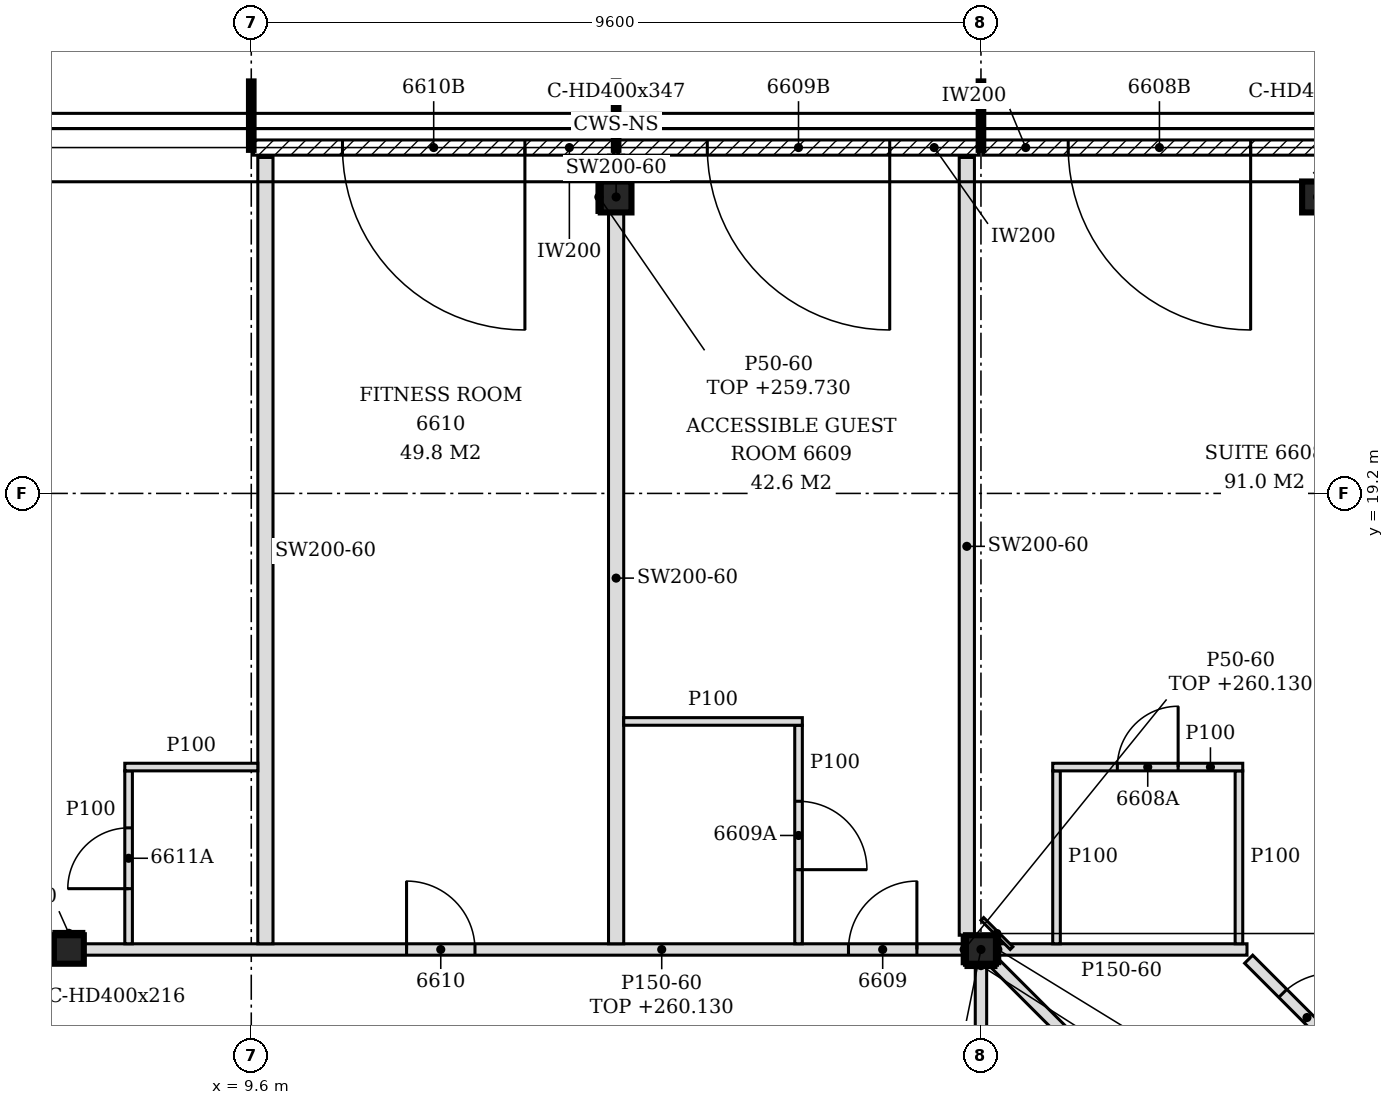
"""IFC4 building model, lengths in metres.
Left out: names, types, materials, properties, quantities, classifications, styles, units other than length and angle.
Written with IfcOpenShell. Run it as: python <this file> out.ifc"""

import sys

from ifc_helpers import new_model, si_unit, direction, frame, frame_2d, origin, origin_2d, place, context, subcontext, project, spatial, polyline, rectangle, i_section, outline, extrude, clip, halfspace, element, fill, save


model = new_model("IFC4")
c1 = context("Model", 3, precision=1e-05, world=origin(), true_north=direction((0.0, 1.0)))
c2 = subcontext(c1, "Body", "Model", "MODEL_VIEW")
j1 = project(units=[si_unit("LENGTHUNIT", "METRE"), si_unit("PLANEANGLEUNIT", "RADIAN")], contexts=[c1])
p1 = place(None, origin())
s1 = spatial("IfcSite", under=j1, at=p1, CompositionType="ELEMENT")
p2 = place(p1, origin())
s2 = spatial("IfcBuilding", under=s1, at=p2, CompositionType="ELEMENT")
p3 = place(p2, frame((0.0, 0.0, 257.4)))
s3 = spatial("IfcBuildingStorey", under=s2, at=p3, CompositionType="ELEMENT", Elevation=257.4)
p4 = place(p3, frame((23.627, 23.1, -0.15), z_axis=(0.0, 0.0, 1.0), x_axis=(1.0, 0.0, 0.0)))
e1 = element("IfcColumn", 1, at=p4, inside=s3, PredefinedType="COLUMN", context=c2, shape_type="Clipping", body=[
    clip(extrude(i_section(OverallWidth=0.404, OverallDepth=0.407, WebThickness=0.027, FlangeThickness=0.044, FilletRadius=0.015, at=origin_2d()), origin(), (0.0, 0.0, 1.0), 3.5), halfspace(frame((0.0, 0.0, 3.05), z_axis=(0.0, 0.0, 1.0), x_axis=(1.0, 0.0, 0.0)), False)),
])
p5 = place(p3, frame((14.4, 23.1, -0.15), z_axis=(0.0, 0.0, 1.0), x_axis=(1.0, 0.0, 0.0)))
e2 = element("IfcColumn", 2, at=p5, inside=s3, PredefinedType="COLUMN", context=c2, shape_type="SweptSolid", body=[
    extrude(i_section(OverallWidth=0.404, OverallDepth=0.407, WebThickness=0.027, FlangeThickness=0.044, FilletRadius=0.015, at=origin_2d()), origin(), (0.0, 0.0, 1.0), 3.5),
])
for number, where, z_axis, x_axis in (
    (3, (7.2, 13.2, -0.15), (0.0, 0.0, 1.0), (1.0, 0.0, 0.0)),
    (4, (19.2, 13.2, -0.15), (0.0, 0.0, 1.0), (1.0, 0.0, 0.0)),
):
    element("IfcColumn", number, at=place(p3, frame(where, z_axis=z_axis, x_axis=x_axis)), inside=s3, PredefinedType="COLUMN", context=c2, shape_type="SweptSolid", body=[
        extrude(i_section(OverallWidth=0.394, OverallDepth=0.375, WebThickness=0.017, FlangeThickness=0.028, FilletRadius=0.015, at=origin_2d()), origin(), (0.0, 0.0, 1.0), 3.5),
    ])
p6 = place(p3, frame((23.856, 23.75, 0.0), z_axis=(0.0, 0.0, 1.0), x_axis=(-1.0, 0.0, 0.0)))
e5 = element("IfcWall", 5, at=p6, inside=s3, PredefinedType="NOTDEFINED", context=c2, shape_type="SweptSolid", body=[
    extrude(rectangle(XDim=4.626, YDim=0.2, at=frame_2d((2.313, 0.0))), origin(), (0.0, 0.0, 1.0), 3.35),
])
p7 = place(p6, frame((1.108, 0.0, 0.0)))
e6 = element("IfcOpeningElement", 6, at=p7, cuts=e5, PredefinedType="OPENING", context=c2, shape_type="SweptSolid", body=[
    extrude(rectangle(XDim=2.4, YDim=2.4, at=frame_2d((1.2, 1.2))), frame((0.0, 0.11, 0.0), z_axis=(0.0, -1.0, 0.0), x_axis=(1.0, 0.0, 0.0)), (0.0, 0.0, 1.0), 0.22),
])
p8 = place(p3, frame((19.17, 23.75, 0.0), z_axis=(0.0, 0.0, 1.0), x_axis=(-1.0, 0.0, 0.0)))
e7 = element("IfcWall", 7, at=p8, inside=s3, PredefinedType="NOTDEFINED", context=c2, shape_type="SweptSolid", body=[
    extrude(rectangle(XDim=4.74, YDim=0.2, at=frame_2d((2.37, 0.0))), origin(), (0.0, 0.0, 1.0), 3.35),
])
p9 = place(p8, frame((1.17, 0.0, 0.0)))
e8 = element("IfcOpeningElement", 8, at=p9, cuts=e7, PredefinedType="OPENING", context=c2, shape_type="SweptSolid", body=[
    extrude(rectangle(XDim=2.4, YDim=2.4, at=frame_2d((1.2, 1.2))), frame((0.0, 0.11, 0.0), z_axis=(0.0, -1.0, 0.0), x_axis=(1.0, 0.0, 0.0)), (0.0, 0.0, 1.0), 0.22),
])
p10 = place(p3, frame((14.37, 23.75, 0.0), z_axis=(0.0, 0.0, 1.0), x_axis=(-1.0, 0.0, 0.0)))
e9 = element("IfcWall", 9, at=p10, inside=s3, PredefinedType="NOTDEFINED", context=c2, shape_type="SweptSolid", body=[
    extrude(rectangle(XDim=4.74, YDim=0.2, at=frame_2d((2.37, 0.0))), origin(), (0.0, 0.0, 1.0), 3.35),
])
p11 = place(p10, frame((1.17, 0.0, 0.0)))
e10 = element("IfcOpeningElement", 10, at=p11, cuts=e9, PredefinedType="OPENING", context=c2, shape_type="SweptSolid", body=[
    extrude(rectangle(XDim=2.4, YDim=2.4, at=frame_2d((1.2, 1.2))), frame((0.0, 0.11, 0.0), z_axis=(0.0, -1.0, 0.0), x_axis=(1.0, 0.0, 0.0)), (0.0, 0.0, 1.0), 0.22),
])
p12 = place(p3, frame((31.129, 1.271, 0.0), z_axis=(0.0, 0.0, 1.0), x_axis=(-0.707114135277, 0.70709942702, 0.0)))
e11 = element("IfcWall", 11, at=p12, inside=s3, PredefinedType="PARTITIONING", context=c2, shape_type="SweptSolid", body=[
    extrude(rectangle(XDim=16.599, YDim=0.15, at=frame_2d((8.299, 0.0))), origin(), (0.0, 0.0, 1.0), 2.78),
])
p13 = place(p12, frame((0.55, 0.0, 0.0)))
e12 = element("IfcOpeningElement", 12, at=p13, cuts=e11, PredefinedType="OPENING", context=c2, shape_type="SweptSolid", body=[
    extrude(rectangle(XDim=0.8, YDim=2.1, at=frame_2d((0.4, 1.05))), frame((0.0, 0.085, 0.0), z_axis=(0.0, -1.0, 0.0), x_axis=(1.0, 0.0, 0.0)), (0.0, 0.0, 1.0), 0.17),
])
p14 = place(p3, frame((33.472, 2.322, 0.0), z_axis=(0.0, 0.0, 1.0), x_axis=(-0.707106781187, 0.707106781187, 0.0)))
e13 = element("IfcWall", 13, at=p14, inside=s3, PredefinedType="PARTITIONING", context=c2, shape_type="SweptSolid", body=[
    extrude(rectangle(XDim=15.203, YDim=0.15, at=frame_2d((7.602, 0.0))), origin(), (0.0, 0.0, 1.0), 2.78),
])
p15 = place(p14, frame((4.951, 0.0, 0.0)))
e14 = element("IfcOpeningElement", 14, at=p15, cuts=e13, PredefinedType="OPENING", context=c2, shape_type="SweptSolid", body=[
    extrude(rectangle(XDim=0.9, YDim=2.1, at=frame_2d((0.45, 1.05))), frame((0.0, 0.085, 0.0), z_axis=(0.0, -1.0, 0.0), x_axis=(1.0, 0.0, 0.0)), (0.0, 0.0, 1.0), 0.17),
])
p16 = place(p14, frame((9.352, 0.0, 0.0)))
e15 = element("IfcOpeningElement", 15, at=p16, cuts=e13, PredefinedType="OPENING", context=c2, shape_type="SweptSolid", body=[
    extrude(rectangle(XDim=0.9, YDim=2.1, at=frame_2d((0.45, 1.05))), frame((0.0, 0.085, 0.0), z_axis=(0.0, -1.0, 0.0), x_axis=(1.0, 0.0, 0.0)), (0.0, 0.0, 1.0), 0.17),
])
p17 = place(p14, frame((13.668, 0.0, 0.0)))
e16 = element("IfcOpeningElement", 16, at=p17, cuts=e13, PredefinedType="OPENING", context=c2, shape_type="SweptSolid", body=[
    extrude(rectangle(XDim=0.9, YDim=2.1, at=frame_2d((0.45, 1.05))), frame((0.0, 0.085, 0.0), z_axis=(0.0, -1.0, 0.0), x_axis=(1.0, 0.0, 0.0)), (0.0, 0.0, 1.0), 0.17),
])
p18 = place(p3, frame((19.2, 2.587, 0.0), z_axis=(0.0, 0.0, 1.0), x_axis=(0.0, 1.0, 0.0)))
e17 = element("IfcWall", 17, at=p18, inside=s3, PredefinedType="PARTITIONING", context=c2, shape_type="SweptSolid", body=[
    extrude(rectangle(XDim=10.425, YDim=0.15, at=frame_2d((5.212, 0.0))), origin(), (0.0, 0.0, 1.0), 2.73),
])
p19 = place(p18, frame((2.062, 0.0, 0.0)))
e18 = element("IfcOpeningElement", 18, at=p19, cuts=e17, PredefinedType="OPENING", context=c2, shape_type="SweptSolid", body=[
    extrude(rectangle(XDim=0.9, YDim=2.1, at=frame_2d((0.45, 1.05))), frame((0.0, 0.085, 0.0), z_axis=(0.0, -1.0, 0.0), x_axis=(1.0, 0.0, 0.0)), (0.0, 0.0, 1.0), 0.17),
])
p20 = place(p3, frame((-4.603, 13.2, 0.0), z_axis=(0.0, 0.0, 1.0), x_axis=(1.0, 0.0, 0.0)))
e19 = element("IfcWall", 19, at=p20, inside=s3, PredefinedType="PARTITIONING", context=c2, shape_type="SweptSolid", body=[
    extrude(outline(polyline([(0.0, 0.0), (11.606, 0.0), (11.606, 2.73), (0.658, 2.73), (0.656, 2.33), (0.0, 2.33), (0.0, 0.0)])), frame((0.0, 0.075, 0.0), z_axis=(0.0, -1.0, 0.0), x_axis=(1.0, 0.0, 0.0)), (0.0, 0.0, 1.0), 0.15),
])
p21 = place(p20, frame((5.746, 0.0, 0.0)))
e20 = element("IfcOpeningElement", 20, at=p21, cuts=e19, PredefinedType="OPENING", context=c2, shape_type="SweptSolid", body=[
    extrude(rectangle(XDim=0.9, YDim=2.1, at=frame_2d((0.45, 1.05))), frame((0.0, 0.085, 0.0), z_axis=(0.0, -1.0, 0.0), x_axis=(1.0, 0.0, 0.0)), (0.0, 0.0, 1.0), 0.17),
])
p22 = place(p3, frame((7.397, 13.2, 0.0), z_axis=(0.0, 0.0, 1.0), x_axis=(1.0, 0.0, 0.0)))
e21 = element("IfcWall", 21, at=p22, inside=s3, PredefinedType="PARTITIONING", context=c2, shape_type="SweptSolid", body=[
    extrude(rectangle(XDim=11.606, YDim=0.15, at=frame_2d((5.803, 0.0))), origin(), (0.0, 0.0, 1.0), 2.73),
])
p23 = place(p22, frame((10.06, 0.0, 0.0)))
e22 = element("IfcOpeningElement", 22, at=p23, cuts=e21, PredefinedType="OPENING", context=c2, shape_type="SweptSolid", body=[
    extrude(rectangle(XDim=0.9, YDim=2.1, at=frame_2d((0.45, 1.05))), frame((0.0, 0.085, 0.0), z_axis=(0.0, -1.0, 0.0), x_axis=(1.0, 0.0, 0.0)), (0.0, 0.0, 1.0), 0.17),
])
p24 = place(p22, frame((4.246, 0.0, 0.0)))
e23 = element("IfcOpeningElement", 23, at=p24, cuts=e21, PredefinedType="OPENING", context=c2, shape_type="SweptSolid", body=[
    extrude(rectangle(XDim=0.9, YDim=2.1, at=frame_2d((0.45, 1.05))), frame((0.0, 0.085, 0.0), z_axis=(0.0, -1.0, 0.0), x_axis=(1.0, 0.0, 0.0)), (0.0, 0.0, 1.0), 0.17),
])
p25 = place(p3, frame((19.397, 13.2, 0.0), z_axis=(0.0, 0.0, 1.0), x_axis=(1.0, 0.0, 0.0)))
e24 = element("IfcWall", 24, at=p25, inside=s3, PredefinedType="PARTITIONING", context=c2, shape_type="SweptSolid", body=[
    extrude(rectangle(XDim=3.303, YDim=0.15, at=frame_2d((1.652, 0.0))), origin(), (0.0, 0.0, 1.0), 3.35),
])
p26 = place(p3, frame((7.986, 13.275, 0.0), z_axis=(0.0, 0.0, 1.0), x_axis=(0.0, 1.0, 0.0)))
e25 = element("IfcWall", 25, at=p26, inside=s3, PredefinedType="PARTITIONING", context=c2, shape_type="SweptSolid", body=[
    extrude(outline(polyline([(0.0, 0.0), (2.275, 0.0), (2.275, 3.35), (0.075, 3.35), (0.073, 2.73), (0.0, 2.73), (0.0, 0.0)])), frame((0.0, 0.05, 0.0), z_axis=(0.0, -1.0, 0.0), x_axis=(1.0, 0.0, 0.0)), (0.0, 0.0, 1.0), 0.1),
])
p27 = place(p26, frame((0.725, 0.0, 0.0)))
e26 = element("IfcOpeningElement", 26, at=p27, cuts=e25, PredefinedType="OPENING", context=c2, shape_type="SweptSolid", body=[
    extrude(rectangle(XDim=0.8, YDim=2.1, at=frame_2d((0.4, 1.05))), frame((0.0, 0.06, 0.0), z_axis=(0.0, -1.0, 0.0), x_axis=(1.0, 0.0, 0.0)), (0.0, 0.0, 1.0), 0.12),
])
p28 = place(p3, frame((9.786, 13.275, 0.0), z_axis=(0.0, 0.0, 1.0), x_axis=(0.0, 1.0, 0.0)))
e27 = element("IfcWall", 27, at=p28, inside=s3, PredefinedType="PARTITIONING", context=c2, shape_type="SweptSolid", body=[
    extrude(outline(polyline([(0.0, 0.0), (10.345, 0.0), (10.345, 3.35), (10.325, 3.35), (10.323, 2.33), (9.325, 2.33), (9.323, 3.35), (6.03, 3.35), (6.028, 2.78), (5.82, 2.78), (5.818, 3.35), (0.075, 3.35), (0.073, 2.73), (0.0, 2.73), (0.0, 0.0)])), frame((0.0, 0.1, 0.0), z_axis=(0.0, -1.0, 0.0), x_axis=(1.0, 0.0, 0.0)), (0.0, 0.0, 1.0), 0.2),
])
p29 = place(p3, frame((14.4, 13.275, 0.0), z_axis=(0.0, 0.0, 1.0), x_axis=(0.0, 1.0, 0.0)))
e28 = element("IfcWall", 28, at=p29, inside=s3, PredefinedType="PARTITIONING", context=c2, shape_type="SweptSolid", body=[
    extrude(outline(polyline([(0.0, 0.0), (9.622, 0.0), (9.622, 2.33), (9.325, 2.33), (9.323, 3.35), (6.03, 3.35), (6.028, 2.78), (5.82, 2.78), (5.818, 3.35), (0.075, 3.35), (0.073, 2.73), (0.0, 2.73), (0.0, 0.0)])), frame((0.0, 0.1, 0.0), z_axis=(0.0, -1.0, 0.0), x_axis=(1.0, 0.0, 0.0)), (0.0, 0.0, 1.0), 0.2),
])
p30 = place(p3, frame((16.8, 13.275, 0.0), z_axis=(0.0, 0.0, 1.0), x_axis=(0.0, 1.0, 0.0)))
e29 = element("IfcWall", 29, at=p30, inside=s3, PredefinedType="PARTITIONING", context=c2, shape_type="SweptSolid", body=[
    extrude(outline(polyline([(0.0, 0.0), (2.875, 0.0), (2.875, 3.35), (0.075, 3.35), (0.073, 2.73), (0.0, 2.73), (0.0, 0.0)])), frame((0.0, 0.05, 0.0), z_axis=(0.0, -1.0, 0.0), x_axis=(1.0, 0.0, 0.0)), (0.0, 0.0, 1.0), 0.1),
])
p31 = place(p30, frame((0.975, 0.0, 0.0)))
e30 = element("IfcOpeningElement", 30, at=p31, cuts=e29, PredefinedType="OPENING", context=c2, shape_type="SweptSolid", body=[
    extrude(rectangle(XDim=0.9, YDim=2.1, at=frame_2d((0.45, 1.05))), frame((0.0, 0.06, 0.0), z_axis=(0.0, -1.0, 0.0), x_axis=(1.0, 0.0, 0.0)), (0.0, 0.0, 1.0), 0.12),
])
for number, where, z_axis, x_axis in (
    (31, (20.194, 13.275, 0.0), (0.0, 0.0, 1.0), (0.0, 1.0, 0.0)),
    (32, (22.594, 13.275, 0.0), (0.0, 0.0, 1.0), (0.0, 1.0, 0.0)),
):
    element("IfcWall", number, at=place(p3, frame(where, z_axis=z_axis, x_axis=x_axis)), inside=s3, PredefinedType="PARTITIONING", context=c2, shape_type="SweptSolid", body=[
        extrude(outline(polyline([(0.0, 0.0), (2.275, 0.0), (2.275, 3.35), (1.23, 3.35), (1.228, 2.78), (1.02, 2.78), (1.018, 3.35), (0.0, 3.35), (0.0, 0.0)])), frame((0.0, 0.05, 0.0), z_axis=(0.0, -1.0, 0.0), x_axis=(1.0, 0.0, 0.0)), (0.0, 0.0, 1.0), 0.1),
    ])
p32 = place(p3, frame((19.014, 13.387, 0.0), z_axis=(0.0, 0.0, 1.0), x_axis=(0.0, 1.0, 0.0)))
e33 = element("IfcWall", 33, at=p32, inside=s3, PredefinedType="PARTITIONING", context=c2, shape_type="SweptSolid", body=[
    extrude(outline(polyline([(0.0, 0.0), (10.233, 0.0), (10.232, 3.35), (10.212, 3.35), (10.21, 2.33), (9.212, 2.33), (9.21, 2.83), (5.917, 2.83), (5.916, 2.78), (5.708, 2.78), (5.706, 2.83), (0.01, 2.83), (0.008, 3.35), (0.0, 3.35), (0.0, 0.0)])), frame((0.0, 0.1, 0.0), z_axis=(0.0, -1.0, 0.0), x_axis=(1.0, 0.0, 0.0)), (0.0, 0.0, 1.0), 0.2),
])
p33 = place(p3, frame((7.936, 15.6, 0.0), z_axis=(0.0, 0.0, 1.0), x_axis=(1.0, 0.0, 0.0)))
e34 = element("IfcWall", 34, at=p33, inside=s3, PredefinedType="PARTITIONING", context=c2, shape_type="SweptSolid", body=[
    extrude(rectangle(XDim=1.75, YDim=0.1, at=frame_2d((0.875, 0.0))), origin(), (0.0, 0.0, 1.0), 3.35),
])
p34 = place(p3, frame((20.144, 15.6, 0.0), z_axis=(0.0, 0.0, 1.0), x_axis=(1.0, 0.0, 0.0)))
e35 = element("IfcWall", 35, at=p34, inside=s3, PredefinedType="PARTITIONING", context=c2, shape_type="SweptSolid", body=[
    extrude(rectangle(XDim=2.5, YDim=0.1, at=frame_2d((1.25, 0.0))), origin(), (0.0, 0.0, 1.0), 3.35),
])
p35 = place(p34, frame((0.85, 0.0, 0.0)))
e36 = element("IfcOpeningElement", 36, at=p35, cuts=e35, PredefinedType="OPENING", context=c2, shape_type="SweptSolid", body=[
    extrude(rectangle(XDim=0.8, YDim=2.1, at=frame_2d((0.4, 1.05))), frame((0.0, 0.06, 0.0), z_axis=(0.0, -1.0, 0.0), x_axis=(1.0, 0.0, 0.0)), (0.0, 0.0, 1.0), 0.12),
])
p36 = place(p3, frame((14.5, 16.2, 0.0), z_axis=(0.0, 0.0, 1.0), x_axis=(1.0, 0.0, 0.0)))
e37 = element("IfcWall", 37, at=p36, inside=s3, PredefinedType="PARTITIONING", context=c2, shape_type="SweptSolid", body=[
    extrude(rectangle(XDim=2.35, YDim=0.1, at=frame_2d((1.175, 0.0))), origin(), (0.0, 0.0, 1.0), 3.35),
])
p37 = place(p3, frame((14.4, 23.303, 0.0), z_axis=(0.0, 0.0, 1.0), x_axis=(0.0, 1.0, 0.0)))
e38 = element("IfcWall", 38, at=p37, inside=s3, PredefinedType="PARTITIONING", context=c2, shape_type="SweptSolid", body=[
    extrude(outline(polyline([(0.0, 0.0), (0.346, 0.0), (0.346, 3.35), (0.296, 3.35), (0.294, 2.33), (0.0, 2.33), (0.0, 0.0)])), frame((0.0, 0.1, 0.0), z_axis=(0.0, -1.0, 0.0), x_axis=(1.0, 0.0, 0.0)), (0.0, 0.0, 1.0), 0.2),
])
p38 = place(p3, frame((18.978, 13.012, 0.0), z_axis=(0.0, 0.0, 1.0), x_axis=(0.0, 1.0, 0.0)))
e39 = element("IfcWall", 39, at=p38, inside=s3, PredefinedType="PARTITIONING", context=c2, shape_type="SweptSolid", body=[
    extrude(rectangle(XDim=0.375, YDim=0.05, at=frame_2d((0.188, 0.0))), origin(), (0.0, 0.0, 1.0), 2.73),
])
p39 = place(p3, frame((19.602, 13.218, 0.0), z_axis=(0.0, 0.0, 1.0), x_axis=(-0.707106781187, 0.707106781187, 0.0)))
e40 = element("IfcWall", 40, at=p39, inside=s3, PredefinedType="PARTITIONING", context=c2, shape_type="SweptSolid", body=[
    extrude(rectangle(XDim=0.544, YDim=0.05, at=frame_2d((0.272, 0.0))), origin(), (0.0, 0.0, 1.0), 2.83),
])
p40 = place(p3, frame((7.003, 13.413, 0.0), z_axis=(0.0, 0.0, 1.0), x_axis=(1.0, 0.0, 0.0)))
e41 = element("IfcWall", 41, at=p40, inside=s3, PredefinedType="PARTITIONING", context=c2, shape_type="SweptSolid", body=[
    extrude(rectangle(XDim=0.394, YDim=0.05, at=frame_2d((0.197, 0.0))), origin(), (0.0, 0.0, 1.0), 2.83),
])
p41 = place(p3, frame((19.003, 12.988, 0.0), z_axis=(0.0, 0.0, 1.0), x_axis=(1.0, 0.0, 0.0)))
e42 = element("IfcWall", 42, at=p41, inside=s3, PredefinedType="PARTITIONING", context=c2, shape_type="SweptSolid", body=[
    extrude(rectangle(XDim=0.394, YDim=0.05, at=frame_2d((0.197, 0.0))), origin(), (0.0, 0.0, 1.0), 2.73),
])
p42 = place(p3, frame((14.173, 22.896, 0.0), z_axis=(0.0, 0.0, 1.0), x_axis=(0.0, 1.0, 0.0)))
e43 = element("IfcWall", 43, at=p42, inside=s3, PredefinedType="PARTITIONING", context=c2, shape_type="SweptSolid", body=[
    extrude(rectangle(XDim=0.407, YDim=0.05, at=frame_2d((0.204, 0.0))), origin(), (0.0, 0.0, 1.0), 2.33),
])
p43 = place(p3, frame((19.422, 13.012, 0.0), z_axis=(0.0, 0.0, 1.0), x_axis=(0.0, 1.0, 0.0)))
e44 = element("IfcWall", 44, at=p43, inside=s3, PredefinedType="PARTITIONING", context=c2, shape_type="SweptSolid", body=[
    extrude(rectangle(XDim=0.375, YDim=0.05, at=frame_2d((0.188, 0.0))), origin(), (0.0, 0.0, 1.0), 3.35),
])
p44 = place(p7, origin())
e45 = element("IfcDoor", 45, at=p44, inside=s3, OperationType="SINGLE_SWING_LEFT", PredefinedType="DOOR", context=c2, shape_type="SweptSolid", body=[
    extrude(rectangle(XDim=2.4, YDim=2.4, at=frame_2d((1.2, 1.2))), frame((0.0, 0.025, 0.0), z_axis=(0.0, -1.0, 0.0), x_axis=(1.0, 0.0, 0.0)), (0.0, 0.0, 1.0), 0.05),
])
fill(e6, e45)
p45 = place(p9, origin())
e46 = element("IfcDoor", 46, at=p45, inside=s3, OperationType="SINGLE_SWING_LEFT", PredefinedType="DOOR", context=c2, shape_type="SweptSolid", body=[
    extrude(rectangle(XDim=2.4, YDim=2.4, at=frame_2d((1.2, 1.2))), frame((0.0, 0.025, 0.0), z_axis=(0.0, -1.0, 0.0), x_axis=(1.0, 0.0, 0.0)), (0.0, 0.0, 1.0), 0.05),
])
fill(e8, e46)
p46 = place(p11, origin())
e47 = element("IfcDoor", 47, at=p46, inside=s3, OperationType="SINGLE_SWING_LEFT", PredefinedType="DOOR", context=c2, shape_type="SweptSolid", body=[
    extrude(rectangle(XDim=2.4, YDim=2.4, at=frame_2d((1.2, 1.2))), frame((0.0, 0.025, 0.0), z_axis=(0.0, -1.0, 0.0), x_axis=(1.0, 0.0, 0.0)), (0.0, 0.0, 1.0), 0.05),
])
fill(e10, e47)
p47 = place(p17, frame((0.9, 0.0, 0.0), z_axis=(0.0, 0.0, 1.0), x_axis=(-1.0, 0.0, 0.0)))
e48 = element("IfcDoor", 48, at=p47, inside=s3, OperationType="SINGLE_SWING_RIGHT", PredefinedType="DOOR", context=c2, shape_type="SweptSolid", body=[
    extrude(rectangle(XDim=0.9, YDim=2.1, at=frame_2d((0.45, 1.05))), frame((0.0, 0.025, 0.0), z_axis=(0.0, -1.0, 0.0), x_axis=(1.0, 0.0, 0.0)), (0.0, 0.0, 1.0), 0.05),
])
fill(e16, e48)
p48 = place(p35, origin())
e49 = element("IfcDoor", 49, at=p48, inside=s3, OperationType="SINGLE_SWING_RIGHT", PredefinedType="DOOR", context=c2, shape_type="SweptSolid", body=[
    extrude(rectangle(XDim=0.8, YDim=2.1, at=frame_2d((0.4, 1.05))), frame((0.0, 0.025, 0.0), z_axis=(0.0, -1.0, 0.0), x_axis=(1.0, 0.0, 0.0)), (0.0, 0.0, 1.0), 0.05),
])
fill(e36, e49)
p49 = place(p23, origin())
e50 = element("IfcDoor", 50, at=p49, inside=s3, OperationType="SINGLE_SWING_RIGHT", PredefinedType="DOOR", context=c2, shape_type="SweptSolid", body=[
    extrude(rectangle(XDim=0.9, YDim=2.1, at=frame_2d((0.45, 1.05))), frame((0.0, 0.025, 0.0), z_axis=(0.0, -1.0, 0.0), x_axis=(1.0, 0.0, 0.0)), (0.0, 0.0, 1.0), 0.05),
])
fill(e22, e50)
p50 = place(p31, frame((0.9, 0.0, 0.0), z_axis=(0.0, 0.0, 1.0), x_axis=(-1.0, 0.0, 0.0)))
e51 = element("IfcDoor", 51, at=p50, inside=s3, OperationType="SINGLE_SWING_RIGHT", PredefinedType="DOOR", context=c2, shape_type="SweptSolid", body=[
    extrude(rectangle(XDim=0.9, YDim=2.1, at=frame_2d((0.45, 1.05))), frame((0.0, 0.025, 0.0), z_axis=(0.0, -1.0, 0.0), x_axis=(1.0, 0.0, 0.0)), (0.0, 0.0, 1.0), 0.05),
])
fill(e30, e51)
p51 = place(p24, origin())
e52 = element("IfcDoor", 52, at=p51, inside=s3, OperationType="SINGLE_SWING_LEFT", PredefinedType="DOOR", context=c2, shape_type="SweptSolid", body=[
    extrude(rectangle(XDim=0.9, YDim=2.1, at=frame_2d((0.45, 1.05))), frame((0.0, 0.025, 0.0), z_axis=(0.0, -1.0, 0.0), x_axis=(1.0, 0.0, 0.0)), (0.0, 0.0, 1.0), 0.05),
])
fill(e23, e52)
p52 = place(p27, origin())
e53 = element("IfcDoor", 53, at=p52, inside=s3, OperationType="SINGLE_SWING_LEFT", PredefinedType="DOOR", context=c2, shape_type="SweptSolid", body=[
    extrude(rectangle(XDim=0.8, YDim=2.1, at=frame_2d((0.4, 1.05))), frame((0.0, 0.025, 0.0), z_axis=(0.0, -1.0, 0.0), x_axis=(1.0, 0.0, 0.0)), (0.0, 0.0, 1.0), 0.05),
])
fill(e26, e53)
save(model, sys.argv[1])
